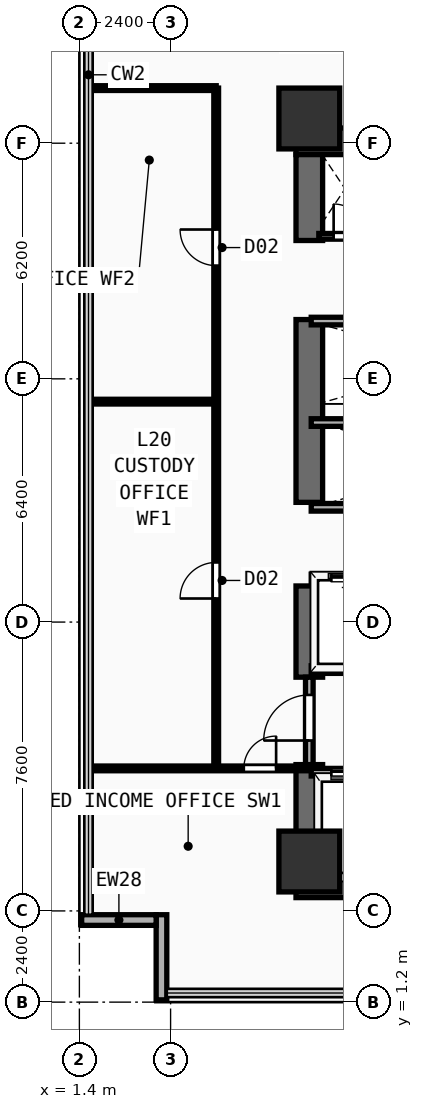
"""IFC4 building model, lengths in metres.
Left out: names, types, materials, properties, quantities, classifications, styles, units other than length and angle.
Written with IfcOpenShell. Run it as: python <this file> out.ifc"""

import sys

from ifc_helpers import new_model, si_unit, direction, frame, frame_2d, origin, origin_2d, place, context, subcontext, project, spatial, rectangle, extrude, element, fill, save


model = new_model("IFC4")
c1 = context("Model", 3, precision=1e-05, world=origin(), true_north=direction((0.0, 1.0)))
c2 = subcontext(c1, "Body", "Model", "MODEL_VIEW")
j1 = project(units=[si_unit("LENGTHUNIT", "METRE"), si_unit("PLANEANGLEUNIT", "RADIAN")], contexts=[c1])
p1 = place(None, origin())
s1 = spatial("IfcSite", under=j1, at=p1, CompositionType="ELEMENT")
p2 = place(p1, origin())
s2 = spatial("IfcBuilding", under=s1, at=p2, CompositionType="ELEMENT")
p3 = place(p2, frame((0.0, 0.0, 79.0)))
s3 = spatial("IfcBuildingStorey", under=s2, at=p3, CompositionType="ELEMENT", Elevation=79.0)
for number, where, z_axis, x_axis in (
    (1, (7.1, 4.3, 0.0), (0.0, 0.0, 1.0), (1.0, 0.0, 0.0)),
    (2, (7.1, 23.85, 0.0), (0.0, 0.0, 1.0), (1.0, 0.0, 0.0)),
):
    element("IfcWall", number, at=place(p3, frame(where, z_axis=z_axis, x_axis=x_axis)), inside=s3, PredefinedType="SHEAR", context=c2, shape_type="SweptSolid", body=[
        extrude(rectangle(XDim=14.05, YDim=0.7, at=frame_2d((7.025, 0.0))), origin(), (0.0, 0.0, 1.0), 3.42),
    ])
p4 = place(p3, frame((7.45, 4.65, 0.0), z_axis=(0.0, 0.0, 1.0), x_axis=(0.0, 1.0, 0.0)))
e3 = element("IfcWall", 3, at=p4, inside=s3, PredefinedType="SHEAR", context=c2, shape_type="SweptSolid", body=[
    extrude(rectangle(XDim=2.8, YDim=0.7, at=frame_2d((1.4, 0.0))), origin(), (0.0, 0.0, 1.0), 3.42),
])
p5 = place(p3, frame((7.45, 9.75, 0.0), z_axis=(0.0, 0.0, 1.0), x_axis=(0.0, 1.0, 0.0)))
e4 = element("IfcWall", 4, at=p5, inside=s3, PredefinedType="SHEAR", context=c2, shape_type="SweptSolid", body=[
    extrude(rectangle(XDim=2.4, YDim=0.7, at=frame_2d((1.2, 0.0))), origin(), (0.0, 0.0, 1.0), 3.42),
])
p6 = place(p3, frame((7.45, 14.35, 0.0), z_axis=(0.0, 0.0, 1.0), x_axis=(0.0, 1.0, 0.0)))
e5 = element("IfcWall", 5, at=p6, inside=s3, PredefinedType="SHEAR", context=c2, shape_type="SweptSolid", body=[
    extrude(rectangle(XDim=4.81, YDim=0.7, at=frame_2d((2.405, 0.0))), origin(), (0.0, 0.0, 1.0), 3.42),
])
p7 = place(p3, frame((7.45, 21.24, 0.0), z_axis=(0.0, 0.0, 1.0), x_axis=(0.0, 1.0, 0.0)))
e6 = element("IfcWall", 6, at=p7, inside=s3, PredefinedType="SHEAR", context=c2, shape_type="SweptSolid", body=[
    extrude(rectangle(XDim=2.26, YDim=0.7, at=frame_2d((1.13, 0.0))), origin(), (0.0, 0.0, 1.0), 3.42),
])
for number, where, z_axis, x_axis in (
    (7, (7.45, 4.9, 0.0), (0.0, 0.0, 1.0), (1.0, 0.0, 0.0)),
    (8, (7.45, 24.45, 0.0), (0.0, 0.0, 1.0), (1.0, 0.0, 0.0)),
):
    element("IfcColumn", number, at=place(p3, frame(where, z_axis=z_axis, x_axis=x_axis)), inside=s3, PredefinedType="COLUMN", context=c2, shape_type="SweptSolid", body=[
        extrude(rectangle(XDim=1.6, YDim=1.6, at=origin_2d()), origin(), (0.0, 0.0, 1.0), 3.42),
    ])
p8 = place(p3, frame((3.56, 1.26, 0.0), z_axis=(0.0, 0.0, 1.0), x_axis=(0.0, 1.0, 0.0)))
e9 = element("IfcWall", 9, at=p8, inside=s3, PredefinedType="SOLIDWALL", context=c2, shape_type="SweptSolid", body=[
    extrude(rectangle(XDim=2.24, YDim=0.28, at=frame_2d((1.12, 0.0))), origin(), (0.0, 0.0, 1.0), 3.42),
])
p9 = place(p3, frame((1.46, 3.36, 0.0), z_axis=(0.0, 0.0, 1.0), x_axis=(1.0, 0.0, 0.0)))
e10 = element("IfcWall", 10, at=p9, inside=s3, PredefinedType="SOLIDWALL", context=c2, shape_type="SweptSolid", body=[
    extrude(rectangle(XDim=1.96, YDim=0.28, at=frame_2d((0.98, 0.0))), origin(), (0.0, 0.0, 1.0), 3.42),
])
p10 = place(p3, frame((7.5, 7.25, 0.0), z_axis=(0.0, 0.0, 1.0), x_axis=(1.0, 0.0, 0.0)))
e11 = element("IfcWall", 11, at=p10, inside=s3, PredefinedType="PARTITIONING", context=c2, shape_type="SweptSolid", body=[
    extrude(rectangle(XDim=8.35, YDim=0.2, at=frame_2d((4.175, 0.0))), origin(), (0.0, 0.0, 1.0), 3.42),
])
p11 = place(p10, frame((0.53, 0.0, 0.0)))
e12 = element("IfcOpeningElement", 12, at=p11, cuts=e11, PredefinedType="OPENING", context=c2, shape_type="SweptSolid", body=[
    extrude(rectangle(XDim=1.1, YDim=2.2, at=frame_2d((0.55, 1.1))), frame((0.0, 0.11, 0.0), z_axis=(0.0, -1.0, 0.0), x_axis=(1.0, 0.0, 0.0)), (0.0, 0.0, 1.0), 0.22),
])
p12 = place(p10, frame((2.37, 0.0, 0.0)))
e13 = element("IfcOpeningElement", 13, at=p12, cuts=e11, PredefinedType="OPENING", context=c2, shape_type="SweptSolid", body=[
    extrude(rectangle(XDim=1.1, YDim=2.2, at=frame_2d((0.55, 1.1))), frame((0.0, 0.11, 0.0), z_axis=(0.0, -1.0, 0.0), x_axis=(1.0, 0.0, 0.0)), (0.0, 0.0, 1.0), 0.22),
])
p13 = place(p10, frame((4.33, 0.0, 0.0)))
e14 = element("IfcOpeningElement", 14, at=p13, cuts=e11, PredefinedType="OPENING", context=c2, shape_type="SweptSolid", body=[
    extrude(rectangle(XDim=1.1, YDim=2.2, at=frame_2d((0.55, 1.1))), frame((0.0, 0.11, 0.0), z_axis=(0.0, -1.0, 0.0), x_axis=(1.0, 0.0, 0.0)), (0.0, 0.0, 1.0), 0.22),
])
p14 = place(p10, frame((6.5, 0.0, 0.0)))
e15 = element("IfcOpeningElement", 15, at=p14, cuts=e11, PredefinedType="OPENING", context=c2, shape_type="SweptSolid", body=[
    extrude(rectangle(XDim=1.1, YDim=2.2, at=frame_2d((0.55, 1.1))), frame((0.0, 0.11, 0.0), z_axis=(0.0, -1.0, 0.0), x_axis=(1.0, 0.0, 0.0)), (0.0, 0.0, 1.0), 0.22),
])
p15 = place(p3, frame((7.5, 9.95, 0.0), z_axis=(0.0, 0.0, 1.0), x_axis=(1.0, 0.0, 0.0)))
e16 = element("IfcWall", 16, at=p15, inside=s3, PredefinedType="PARTITIONING", context=c2, shape_type="SweptSolid", body=[
    extrude(rectangle(XDim=8.35, YDim=0.2, at=frame_2d((4.175, 0.0))), origin(), (0.0, 0.0, 1.0), 3.42),
])
p16 = place(p3, frame((7.45, 7.45, 0.0), z_axis=(0.0, 0.0, 1.0), x_axis=(0.0, 1.0, 0.0)))
e17 = element("IfcWall", 17, at=p16, inside=s3, PredefinedType="PARTITIONING", context=c2, shape_type="SweptSolid", body=[
    extrude(rectangle(XDim=2.3, YDim=0.2, at=frame_2d((1.15, 0.0))), origin(), (0.0, 0.0, 1.0), 2.4),
])
p17 = place(p16, frame((0.633, 0.0, 0.0)))
e18 = element("IfcOpeningElement", 18, at=p17, cuts=e17, PredefinedType="OPENING", context=c2, shape_type="SweptSolid", body=[
    extrude(rectangle(XDim=1.2, YDim=2.25, at=frame_2d((0.6, 1.125))), frame((0.0, 0.11, 0.0), z_axis=(0.0, -1.0, 0.0), x_axis=(1.0, 0.0, 0.0)), (0.0, 0.0, 1.0), 0.22),
])
p18 = place(p3, frame((7.5, 12.36, 0.0), z_axis=(0.0, 0.0, 1.0), x_axis=(1.0, 0.0, 0.0)))
e19 = element("IfcWall", 19, at=p18, inside=s3, PredefinedType="PARTITIONING", context=c2, shape_type="SweptSolid", body=[
    extrude(rectangle(XDim=7.85, YDim=0.2, at=frame_2d((3.925, 0.0))), origin(), (0.0, 0.0, 1.0), 3.42),
])
p19 = place(p18, frame((0.53, 0.0, 0.0)))
e20 = element("IfcOpeningElement", 20, at=p19, cuts=e19, PredefinedType="OPENING", context=c2, shape_type="SweptSolid", body=[
    extrude(rectangle(XDim=1.1, YDim=2.2, at=frame_2d((0.55, 1.1))), frame((0.0, 0.11, 0.0), z_axis=(0.0, -1.0, 0.0), x_axis=(1.0, 0.0, 0.0)), (0.0, 0.0, 1.0), 0.22),
])
p20 = place(p18, frame((2.42, 0.0, 0.0)))
e21 = element("IfcOpeningElement", 21, at=p20, cuts=e19, PredefinedType="OPENING", context=c2, shape_type="SweptSolid", body=[
    extrude(rectangle(XDim=1.1, YDim=2.2, at=frame_2d((0.55, 1.1))), frame((0.0, 0.11, 0.0), z_axis=(0.0, -1.0, 0.0), x_axis=(1.0, 0.0, 0.0)), (0.0, 0.0, 1.0), 0.22),
])
p21 = place(p18, frame((4.31, 0.0, 0.0)))
e22 = element("IfcOpeningElement", 22, at=p21, cuts=e19, PredefinedType="OPENING", context=c2, shape_type="SweptSolid", body=[
    extrude(rectangle(XDim=1.1, YDim=2.2, at=frame_2d((0.55, 1.1))), frame((0.0, 0.11, 0.0), z_axis=(0.0, -1.0, 0.0), x_axis=(1.0, 0.0, 0.0)), (0.0, 0.0, 1.0), 0.22),
])
p22 = place(p18, frame((6.2, 0.0, 0.0)))
e23 = element("IfcOpeningElement", 23, at=p22, cuts=e19, PredefinedType="OPENING", context=c2, shape_type="SweptSolid", body=[
    extrude(rectangle(XDim=1.1, YDim=2.2, at=frame_2d((0.55, 1.1))), frame((0.0, 0.11, 0.0), z_axis=(0.0, -1.0, 0.0), x_axis=(1.0, 0.0, 0.0)), (0.0, 0.0, 1.0), 0.22),
])
for number, where, z_axis, x_axis in (
    (24, (7.5, 14.22, 0.0), (0.0, 0.0, 1.0), (1.0, 0.0, 0.0)),
    (25, (7.5, 16.45, 0.0), (0.0, 0.0, 1.0), (1.0, 0.0, 0.0)),
    (26, (7.5, 19.12, 0.0), (0.0, 0.0, 1.0), (1.0, 0.0, 0.0)),
):
    element("IfcWall", number, at=place(p3, frame(where, z_axis=z_axis, x_axis=x_axis)), inside=s3, PredefinedType="PARTITIONING", context=c2, shape_type="SweptSolid", body=[
        extrude(rectangle(XDim=7.85, YDim=0.2, at=frame_2d((3.925, 0.0))), origin(), (0.0, 0.0, 1.0), 3.42),
    ])
p23 = place(p3, frame((7.7, 21.35, 0.0), z_axis=(0.0, 0.0, 1.0), x_axis=(1.0, 0.0, 0.0)))
e27 = element("IfcWall", 27, at=p23, inside=s3, PredefinedType="PARTITIONING", context=c2, shape_type="SweptSolid", body=[
    extrude(rectangle(XDim=1.55, YDim=0.15, at=frame_2d((0.775, 0.0))), origin(), (0.0, 0.0, 1.0), 3.42),
])
p24 = place(p23, frame((0.39, 0.0, 0.0)))
e28 = element("IfcOpeningElement", 28, at=p24, cuts=e27, PredefinedType="OPENING", context=c2, shape_type="SweptSolid", body=[
    extrude(rectangle(XDim=0.85, YDim=2.15, at=frame_2d((0.425, 1.075))), frame((0.0, 0.085, 0.0), z_axis=(0.0, -1.0, 0.0), x_axis=(1.0, 0.0, 0.0)), (0.0, 0.0, 1.0), 0.17),
])
p25 = place(p3, frame((1.64, 7.35, 0.0), z_axis=(0.0, 0.0, 1.0), x_axis=(1.0, 0.0, 0.0)))
e29 = element("IfcWall", 29, at=p25, inside=s3, PredefinedType="PARTITIONING", context=c2, shape_type="SweptSolid", body=[
    extrude(rectangle(XDim=5.76, YDim=0.125, at=frame_2d((2.88, 0.0))), origin(), (0.0, 0.0, 1.0), 3.42),
])
p26 = place(p25, frame((4.087, 0.0, 0.0)))
e30 = element("IfcOpeningElement", 30, at=p26, cuts=e29, PredefinedType="OPENING", context=c2, shape_type="SweptSolid", body=[
    extrude(rectangle(XDim=0.85, YDim=2.15, at=frame_2d((0.425, 1.075))), frame((0.0, 0.073, 0.0), z_axis=(0.0, -1.0, 0.0), x_axis=(1.0, 0.0, 0.0)), (0.0, 0.0, 1.0), 0.145),
])
p27 = place(p3, frame((5.0, 7.5, 0.0), z_axis=(0.0, 0.0, 1.0), x_axis=(0.0, 1.0, 0.0)))
e31 = element("IfcWall", 31, at=p27, inside=s3, PredefinedType="PARTITIONING", context=c2, shape_type="SweptSolid", body=[
    extrude(rectangle(XDim=17.75, YDim=0.125, at=frame_2d((8.875, 0.0))), origin(), (0.0, 0.0, 1.0), 3.42),
])
p28 = place(p27, frame((4.32, 0.0, 0.0)))
e32 = element("IfcOpeningElement", 32, at=p28, cuts=e31, PredefinedType="OPENING", context=c2, shape_type="SweptSolid", body=[
    extrude(rectangle(XDim=0.95, YDim=2.15, at=frame_2d((0.475, 1.075))), frame((0.0, 0.073, 0.0), z_axis=(0.0, -1.0, 0.0), x_axis=(1.0, 0.0, 0.0)), (0.0, 0.0, 1.0), 0.145),
])
p29 = place(p27, frame((13.079, 0.0, 0.0)))
e33 = element("IfcOpeningElement", 33, at=p29, cuts=e31, PredefinedType="OPENING", context=c2, shape_type="SweptSolid", body=[
    extrude(rectangle(XDim=0.95, YDim=2.15, at=frame_2d((0.475, 1.075))), frame((0.0, 0.073, 0.0), z_axis=(0.0, -1.0, 0.0), x_axis=(1.0, 0.0, 0.0)), (0.0, 0.0, 1.0), 0.145),
])
for number, where, z_axis, x_axis in (
    (34, (1.64, 25.25, 0.0), (0.0, 0.0, 1.0), (1.0, 0.0, 0.0)),
    (35, (1.64, 17.0, 0.0), (0.0, 0.0, 1.0), (1.0, 0.0, 0.0)),
):
    element("IfcWall", number, at=place(p3, frame(where, z_axis=z_axis, x_axis=x_axis)), inside=s3, PredefinedType="PARTITIONING", context=c2, shape_type="SweptSolid", body=[
        extrude(rectangle(XDim=3.36, YDim=0.125, at=frame_2d((1.68, 0.0))), origin(), (0.0, 0.0, 1.0), 3.42),
    ])
p30 = place(p11, origin())
e36 = element("IfcDoor", 36, at=p30, inside=s3, OperationType="SLIDING_TO_LEFT", PredefinedType="DOOR", context=c2, shape_type="SweptSolid", body=[
    extrude(rectangle(XDim=1.1, YDim=2.2, at=frame_2d((0.55, 1.1))), frame((0.0, 0.025, 0.0), z_axis=(0.0, -1.0, 0.0), x_axis=(1.0, 0.0, 0.0)), (0.0, 0.0, 1.0), 0.05),
])
fill(e12, e36)
p31 = place(p17, frame((1.2, 0.0, 0.0), z_axis=(0.0, 0.0, 1.0), x_axis=(-1.0, 0.0, 0.0)))
e37 = element("IfcDoor", 37, at=p31, inside=s3, OperationType="SINGLE_SWING_RIGHT", PredefinedType="DOOR", context=c2, shape_type="SweptSolid", body=[
    extrude(rectangle(XDim=1.2, YDim=2.25, at=frame_2d((0.6, 1.125))), frame((0.0, 0.025, 0.0), z_axis=(0.0, -1.0, 0.0), x_axis=(1.0, 0.0, 0.0)), (0.0, 0.0, 1.0), 0.05),
])
fill(e18, e37)
p32 = place(p19, origin())
e38 = element("IfcDoor", 38, at=p32, inside=s3, OperationType="SLIDING_TO_LEFT", PredefinedType="DOOR", context=c2, shape_type="SweptSolid", body=[
    extrude(rectangle(XDim=1.1, YDim=2.2, at=frame_2d((0.55, 1.1))), frame((0.0, 0.025, 0.0), z_axis=(0.0, -1.0, 0.0), x_axis=(1.0, 0.0, 0.0)), (0.0, 0.0, 1.0), 0.05),
])
fill(e20, e38)
p33 = place(p24, origin())
e39 = element("IfcDoor", 39, at=p33, inside=s3, OperationType="SINGLE_SWING_LEFT", PredefinedType="DOOR", context=c2, shape_type="SweptSolid", body=[
    extrude(rectangle(XDim=0.85, YDim=2.15, at=frame_2d((0.425, 1.075))), frame((0.0, 0.025, 0.0), z_axis=(0.0, -1.0, 0.0), x_axis=(1.0, 0.0, 0.0)), (0.0, 0.0, 1.0), 0.05),
])
fill(e28, e39)
p34 = place(p26, origin())
e40 = element("IfcDoor", 40, at=p34, inside=s3, OperationType="SINGLE_SWING_RIGHT", PredefinedType="DOOR", context=c2, shape_type="SweptSolid", body=[
    extrude(rectangle(XDim=0.85, YDim=2.15, at=frame_2d((0.425, 1.075))), frame((0.0, 0.025, 0.0), z_axis=(0.0, -1.0, 0.0), x_axis=(1.0, 0.0, 0.0)), (0.0, 0.0, 1.0), 0.05),
])
fill(e30, e40)
p35 = place(p28, origin())
e41 = element("IfcDoor", 41, at=p35, inside=s3, OperationType="SINGLE_SWING_LEFT", PredefinedType="DOOR", context=c2, shape_type="SweptSolid", body=[
    extrude(rectangle(XDim=0.95, YDim=2.15, at=frame_2d((0.475, 1.075))), frame((0.0, 0.025, 0.0), z_axis=(0.0, -1.0, 0.0), x_axis=(1.0, 0.0, 0.0)), (0.0, 0.0, 1.0), 0.05),
])
fill(e32, e41)
p36 = place(p29, origin())
e42 = element("IfcDoor", 42, at=p36, inside=s3, OperationType="SINGLE_SWING_RIGHT", PredefinedType="DOOR", context=c2, shape_type="SweptSolid", body=[
    extrude(rectangle(XDim=0.95, YDim=2.15, at=frame_2d((0.475, 1.075))), frame((0.0, 0.025, 0.0), z_axis=(0.0, -1.0, 0.0), x_axis=(1.0, 0.0, 0.0)), (0.0, 0.0, 1.0), 0.05),
])
fill(e33, e42)
save(model, sys.argv[1])
